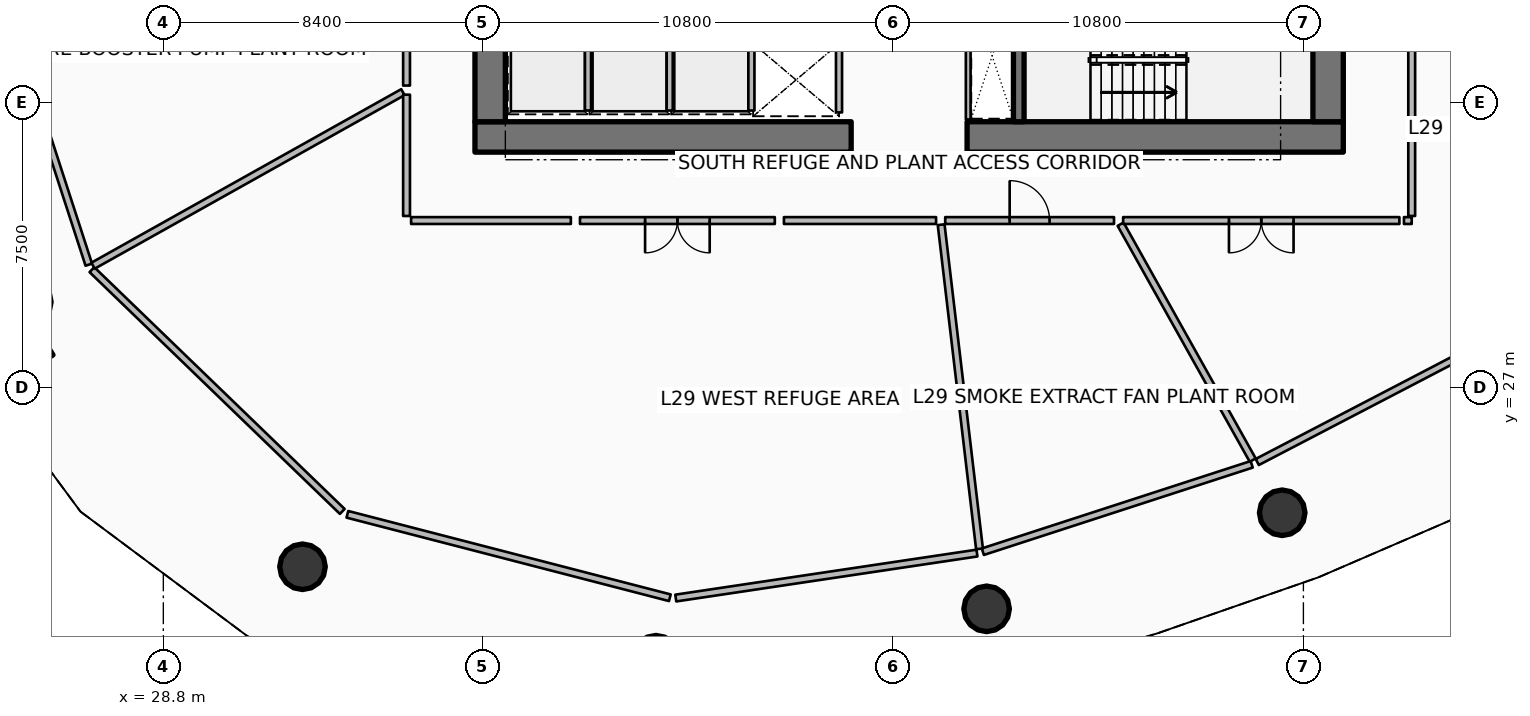
"""IFC4 building model, lengths in metres.
Left out: names, types, materials, properties, quantities, classifications, styles, units other than length and angle.
Written with IfcOpenShell. Run it as: python <this file> out.ifc"""

import sys

from ifc_helpers import new_model, si_unit, direction, frame, frame_2d, origin, origin_2d, place, context, subcontext, project, spatial, rectangle, circle, extrude, element, fill, save


model = new_model("IFC4")
c1 = context("Model", 3, precision=1e-05, world=origin(), true_north=direction((0.0, 1.0)))
c2 = subcontext(c1, "Body", "Model", "MODEL_VIEW")
j1 = project(units=[si_unit("LENGTHUNIT", "METRE"), si_unit("PLANEANGLEUNIT", "RADIAN")], contexts=[c1])
p1 = place(None, origin())
s1 = spatial("IfcSite", under=j1, at=p1, CompositionType="ELEMENT")
p2 = place(p1, origin())
s2 = spatial("IfcBuilding", under=s1, at=p2, CompositionType="ELEMENT")
p3 = place(p2, frame((0.0, 0.0, 116.4)))
s3 = spatial("IfcBuildingStorey", under=s2, at=p3, CompositionType="ELEMENT", Elevation=116.4)
p4 = place(p3, frame((37.0, 33.6, 0.0), z_axis=(0.0, 0.0, 1.0), x_axis=(1.0, 0.0, 0.0)))
e1 = element("IfcWall", 1, at=p4, inside=s3, PredefinedType="SHEAR", context=c2, shape_type="SweptSolid", body=[
    extrude(rectangle(XDim=9.9, YDim=0.8, at=frame_2d((4.95, 0.0))), origin(), (0.0, 0.0, 1.0), 6.6),
])
p5 = place(p3, frame((49.95, 33.6, 0.0), z_axis=(0.0, 0.0, 1.0), x_axis=(1.0, 0.0, 0.0)))
e2 = element("IfcWall", 2, at=p5, inside=s3, PredefinedType="SHEAR", context=c2, shape_type="SweptSolid", body=[
    extrude(rectangle(XDim=9.9, YDim=0.8, at=frame_2d((4.95, 0.0))), origin(), (0.0, 0.0, 1.0), 6.6),
])
for number, where, z_axis, x_axis in (
    (3, (37.4, 34.0, 0.0), (0.0, 0.0, 1.0), (0.0, 1.0, 0.0)),
    (4, (59.45, 34.0, 0.0), (0.0, 0.0, 1.0), (0.0, 1.0, 0.0)),
):
    element("IfcWall", number, at=place(p3, frame(where, z_axis=z_axis, x_axis=x_axis)), inside=s3, PredefinedType="SHEAR", context=c2, shape_type="SweptSolid", body=[
        extrude(rectangle(XDim=16.0, YDim=0.8, at=frame_2d((8.0, 0.0))), origin(), (0.0, 0.0, 1.0), 6.6),
    ])
p6 = place(p3, frame((51.31, 34.0, 0.0), z_axis=(0.0, 0.0, 1.0), x_axis=(0.0, 1.0, 0.0)))
e5 = element("IfcWall", 5, at=p6, inside=s3, PredefinedType="SHEAR", context=c2, shape_type="SweptSolid", body=[
    extrude(rectangle(XDim=3.5, YDim=0.28, at=frame_2d((1.75, 0.0))), origin(), (0.0, 0.0, 1.0), 6.6),
])
p7 = place(p3, frame((25.751, 28.097, 0.0), z_axis=(0.0, 0.0, 1.0), x_axis=(-0.848033572426, -0.529942506352, 0.0)))
e6 = element("IfcWall", 6, at=p7, inside=s3, PredefinedType="SOLIDWALL", context=c2, shape_type="SweptSolid", body=[
    extrude(rectangle(XDim=3.5, YDim=0.55, at=frame_2d((1.75, 0.0))), origin(), (0.0, 0.0, 1.0), 6.6),
])
for number, where, z_axis, x_axis in (
    (7, (32.462, 22.29, 0.0), (0.0, 0.0, 1.0), (1.0, 0.0, 0.0)),
    (8, (41.763, 19.884, 0.0), (0.0, 0.0, 1.0), (1.0, 0.0, 0.0)),
    (9, (50.464, 21.183, 0.0), (0.0, 0.0, 1.0), (1.0, 0.0, 0.0)),
    (10, (58.242, 23.711, 0.0), (0.0, 0.0, 1.0), (1.0, 0.0, 0.0)),
):
    element("IfcColumn", number, at=place(p3, frame(where, z_axis=z_axis, x_axis=x_axis)), inside=s3, PredefinedType="COLUMN", context=c2, shape_type="SweptSolid", body=[
        extrude(circle(Radius=0.6, at=origin_2d()), origin(), (0.0, 0.0, 1.0), 6.28),
    ])
for number, where, z_axis, x_axis in (
    (11, (39.975, 34.295, 0.0), (0.0, 0.0, 1.0), (0.0, 1.0, 0.0)),
    (12, (42.125, 34.295, 0.0), (0.0, 0.0, 1.0), (0.0, 1.0, 0.0)),
    (13, (44.275, 34.295, 0.0), (0.0, 0.0, 1.0), (0.0, 1.0, 0.0)),
):
    element("IfcWall", number, at=place(p3, frame(where, z_axis=z_axis, x_axis=x_axis)), inside=s3, PredefinedType="PARTITIONING", context=c2, shape_type="SweptSolid", body=[
        extrude(rectangle(XDim=1.61, YDim=0.16, at=frame_2d((0.805, 0.0))), origin(), (0.0, 0.0, 1.0), 6.28),
    ])
p8 = place(p3, frame((46.58, 34.245, 0.0), z_axis=(0.0, 0.0, 1.0), x_axis=(0.0, 1.0, 0.0)))
e14 = element("IfcWall", 14, at=p8, inside=s3, PredefinedType="PARTITIONING", context=c2, shape_type="SweptSolid", body=[
    extrude(rectangle(XDim=1.71, YDim=0.16, at=frame_2d((0.855, 0.0))), origin(), (0.0, 0.0, 1.0), 6.28),
])
p9 = place(p3, frame((49.98, 34.06, 0.0), z_axis=(0.0, 0.0, 1.0), x_axis=(0.0, 1.0, 0.0)))
e15 = element("IfcWall", 15, at=p9, inside=s3, PredefinedType="PARTITIONING", context=c2, shape_type="SweptSolid", body=[
    extrude(rectangle(XDim=3.4, YDim=0.125, at=frame_2d((1.7, 0.0))), origin(), (0.0, 0.0, 1.0), 5.72),
])
p10 = place(p3, frame((23.967, 39.076, 0.0), z_axis=(0.0, 0.0, 1.0), x_axis=(0.309006462603, -0.951059938211, 0.0)))
e16 = element("IfcWall", 16, at=p10, inside=s3, PredefinedType="PARTITIONING", context=c2, shape_type="SweptSolid", body=[
    extrude(rectangle(XDim=9.292, YDim=0.18, at=frame_2d((4.646, 0.0))), origin(), (0.0, 0.0, 1.0), 5.273),
])
p11 = place(p3, frame((26.921, 30.107, 0.0), z_axis=(0.0, 0.0, 1.0), x_axis=(0.719342658177, -0.694655411069, 0.0)))
e17 = element("IfcWall", 17, at=p11, inside=s3, PredefinedType="PARTITIONING", context=c2, shape_type="SweptSolid", body=[
    extrude(rectangle(XDim=9.157, YDim=0.18, at=frame_2d((4.579, 0.0))), origin(), (0.0, 0.0, 1.0), 2.304),
])
p12 = place(p3, frame((33.643, 23.67, 0.0), z_axis=(0.0, 0.0, 1.0), x_axis=(0.968122342154, -0.250477804651, 0.0)))
e18 = element("IfcWall", 18, at=p12, inside=s3, PredefinedType="PARTITIONING", context=c2, shape_type="SweptSolid", body=[
    extrude(rectangle(XDim=8.764, YDim=0.18, at=frame_2d((4.382, 0.0))), origin(), (0.0, 0.0, 1.0), 2.304),
])
p13 = place(p3, frame((42.285, 21.467, 0.0), z_axis=(0.0, 0.0, 1.0), x_axis=(0.989034471801, 0.147684845497, 0.0)))
e19 = element("IfcWall", 19, at=p13, inside=s3, PredefinedType="PARTITIONING", context=c2, shape_type="SweptSolid", body=[
    extrude(rectangle(XDim=8.013, YDim=0.18, at=frame_2d((4.006, 0.0))), origin(), (0.0, 0.0, 1.0), 2.304),
])
p14 = place(p3, frame((50.365, 22.687, 0.0), z_axis=(0.0, 0.0, 1.0), x_axis=(0.951058670218, 0.309010365204, 0.0)))
e20 = element("IfcWall", 20, at=p14, inside=s3, PredefinedType="PARTITIONING", context=c2, shape_type="SweptSolid", body=[
    extrude(rectangle(XDim=7.438, YDim=0.18, at=frame_2d((3.719, 0.0))), origin(), (0.0, 0.0, 1.0), 5.273),
])
p15 = place(p3, frame((57.586, 25.047, 0.0), z_axis=(0.0, 0.0, 1.0), x_axis=(0.886950751462, 0.46186401081, 0.0)))
e21 = element("IfcWall", 21, at=p15, inside=s3, PredefinedType="PARTITIONING", context=c2, shape_type="SweptSolid", body=[
    extrude(rectangle(XDim=8.012, YDim=0.18, at=frame_2d((4.006, 0.0))), origin(), (0.0, 0.0, 1.0), 2.304),
])
p16 = place(p3, frame((35.2, 40.365, 0.0), z_axis=(0.0, 0.0, 1.0), x_axis=(0.0, -1.0, 0.0)))
e22 = element("IfcWall", 22, at=p16, inside=s3, PredefinedType="PARTITIONING", context=c2, shape_type="SweptSolid", body=[
    extrude(rectangle(XDim=5.413, YDim=0.18, at=frame_2d((2.707, 0.0))), origin(), (0.0, 0.0, 1.0), 5.273),
])
p17 = place(p16, frame((2.182, 0.0, 0.0)))
e23 = element("IfcOpeningElement", 23, at=p17, cuts=e22, PredefinedType="OPENING", context=c2, shape_type="SweptSolid", body=[
    extrude(rectangle(XDim=1.05, YDim=2.1, at=frame_2d((0.525, 1.05))), frame((0.0, 0.1, 0.0), z_axis=(0.0, -1.0, 0.0), x_axis=(1.0, 0.0, 0.0)), (0.0, 0.0, 1.0), 0.2),
])
p18 = place(p3, frame((35.104, 34.778, 0.0), z_axis=(0.0, 0.0, 1.0), x_axis=(-0.872492204965, -0.488628030586, 0.0)))
e24 = element("IfcWall", 24, at=p18, inside=s3, PredefinedType="PARTITIONING", context=c2, shape_type="SweptSolid", body=[
    extrude(rectangle(XDim=9.345, YDim=0.18, at=frame_2d((4.672, 0.0))), origin(), (0.0, 0.0, 1.0), 5.273),
])
p19 = place(p3, frame((35.2, 34.712, 0.0), z_axis=(0.0, 0.0, 1.0), x_axis=(0.0, -1.0, 0.0)))
e25 = element("IfcWall", 25, at=p19, inside=s3, PredefinedType="PARTITIONING", context=c2, shape_type="SweptSolid", body=[
    extrude(rectangle(XDim=3.192, YDim=0.18, at=frame_2d((1.596, 0.0))), origin(), (0.0, 0.0, 1.0), 5.273),
])
p20 = place(p3, frame((35.32, 31.4, 0.0), z_axis=(0.0, 0.0, 1.0), x_axis=(1.0, 0.0, 0.0)))
e26 = element("IfcWall", 26, at=p20, inside=s3, PredefinedType="PARTITIONING", context=c2, shape_type="SweptSolid", body=[
    extrude(rectangle(XDim=4.204, YDim=0.18, at=frame_2d((2.102, 0.0))), origin(), (0.0, 0.0, 1.0), 2.304),
])
p21 = place(p3, frame((39.764, 31.4, 0.0), z_axis=(0.0, 0.0, 1.0), x_axis=(1.0, 0.0, 0.0)))
e27 = element("IfcWall", 27, at=p21, inside=s3, PredefinedType="PARTITIONING", context=c2, shape_type="SweptSolid", body=[
    extrude(rectangle(XDim=5.127, YDim=0.18, at=frame_2d((2.563, 0.0))), origin(), (0.0, 0.0, 1.0), 2.304),
])
p22 = place(p21, frame((1.713, 0.0, 0.0)))
e28 = element("IfcOpeningElement", 28, at=p22, cuts=e27, PredefinedType="OPENING", context=c2, shape_type="SweptSolid", body=[
    extrude(rectangle(XDim=1.7, YDim=2.15, at=frame_2d((0.85, 1.075))), frame((0.0, 0.1, 0.0), z_axis=(0.0, -1.0, 0.0), x_axis=(1.0, 0.0, 0.0)), (0.0, 0.0, 1.0), 0.2),
])
p23 = place(p3, frame((45.131, 31.4, 0.0), z_axis=(0.0, 0.0, 1.0), x_axis=(1.0, 0.0, 0.0)))
e29 = element("IfcWall", 29, at=p23, inside=s3, PredefinedType="PARTITIONING", context=c2, shape_type="SweptSolid", body=[
    extrude(rectangle(XDim=4.004, YDim=0.18, at=frame_2d((2.002, 0.0))), origin(), (0.0, 0.0, 1.0), 2.304),
])
p24 = place(p3, frame((49.268, 31.291, 0.0), z_axis=(0.0, 0.0, 1.0), x_axis=(0.117538852682, -0.993068284717, 0.0)))
e30 = element("IfcWall", 30, at=p24, inside=s3, PredefinedType="PARTITIONING", context=c2, shape_type="SweptSolid", body=[
    extrude(rectangle(XDim=8.589, YDim=0.18, at=frame_2d((4.294, 0.0))), origin(), (0.0, 0.0, 1.0), 5.273),
])
p25 = place(p3, frame((49.375, 31.4, 0.0), z_axis=(0.0, 0.0, 1.0), x_axis=(1.0, 0.0, 0.0)))
e31 = element("IfcWall", 31, at=p25, inside=s3, PredefinedType="PARTITIONING", context=c2, shape_type="SweptSolid", body=[
    extrude(rectangle(XDim=4.442, YDim=0.18, at=frame_2d((2.221, 0.0))), origin(), (0.0, 0.0, 1.0), 5.273),
])
p26 = place(p25, frame((1.696, 0.0, 0.0)))
e32 = element("IfcOpeningElement", 32, at=p26, cuts=e31, PredefinedType="OPENING", context=c2, shape_type="SweptSolid", body=[
    extrude(rectangle(XDim=1.05, YDim=2.1, at=frame_2d((0.525, 1.05))), frame((0.0, 0.1, 0.0), z_axis=(0.0, -1.0, 0.0), x_axis=(1.0, 0.0, 0.0)), (0.0, 0.0, 1.0), 0.2),
])
p27 = place(p3, frame((53.99, 31.304, 0.0), z_axis=(0.0, 0.0, 1.0), x_axis=(0.488621135235, -0.872496066583, 0.0)))
e33 = element("IfcWall", 33, at=p27, inside=s3, PredefinedType="PARTITIONING", context=c2, shape_type="SweptSolid", body=[
    extrude(rectangle(XDim=7.114, YDim=0.18, at=frame_2d((3.557, 0.0))), origin(), (0.0, 0.0, 1.0), 5.273),
])
p28 = place(p3, frame((54.056, 31.4, 0.0), z_axis=(0.0, 0.0, 1.0), x_axis=(1.0, 0.0, 0.0)))
e34 = element("IfcWall", 34, at=p28, inside=s3, PredefinedType="PARTITIONING", context=c2, shape_type="SweptSolid", body=[
    extrude(rectangle(XDim=7.27, YDim=0.18, at=frame_2d((3.635, 0.0))), origin(), (0.0, 0.0, 1.0), 2.304),
])
p29 = place(p28, frame((2.785, 0.0, 0.0)))
e35 = element("IfcOpeningElement", 35, at=p29, cuts=e34, PredefinedType="OPENING", context=c2, shape_type="SweptSolid", body=[
    extrude(rectangle(XDim=1.7, YDim=2.15, at=frame_2d((0.85, 1.075))), frame((0.0, 0.1, 0.0), z_axis=(0.0, -1.0, 0.0), x_axis=(1.0, 0.0, 0.0)), (0.0, 0.0, 1.0), 0.2),
])
p30 = place(p3, frame((61.446, 31.4, 0.0), z_axis=(0.0, 0.0, 1.0), x_axis=(1.0, 0.0, 0.0)))
e36 = element("IfcWall", 36, at=p30, inside=s3, PredefinedType="PARTITIONING", context=c2, shape_type="SweptSolid", body=[
    extrude(rectangle(XDim=0.204, YDim=0.18, at=frame_2d((0.102, 0.0))), origin(), (0.0, 0.0, 1.0), 2.304),
])
p31 = place(p3, frame((61.65, 31.52, 0.0), z_axis=(0.0, 0.0, 1.0), x_axis=(0.0, 1.0, 0.0)))
e37 = element("IfcWall", 37, at=p31, inside=s3, PredefinedType="PARTITIONING", context=c2, shape_type="SweptSolid", body=[
    extrude(rectangle(XDim=6.51, YDim=0.18, at=frame_2d((3.255, 0.0))), origin(), (0.0, 0.0, 1.0), 2.304),
])
p32 = place(p3, frame((61.756, 38.12, 0.0), z_axis=(0.0, 0.0, 1.0), x_axis=(0.962455908165, -0.271438068147, 0.0)))
e38 = element("IfcWall", 38, at=p32, inside=s3, PredefinedType="PARTITIONING", context=c2, shape_type="SweptSolid", body=[
    extrude(rectangle(XDim=8.922, YDim=0.18, at=frame_2d((4.461, 0.0))), origin(), (0.0, 0.0, 1.0), 2.304),
])
p33 = place(p22, origin())
e39 = element("IfcDoor", 39, at=p33, inside=s3, OperationType="DOUBLE_DOOR_SINGLE_SWING", PredefinedType="DOOR", context=c2, shape_type="SweptSolid", body=[
    extrude(rectangle(XDim=1.7, YDim=2.15, at=frame_2d((0.85, 1.075))), frame((0.0, 0.025, 0.0), z_axis=(0.0, -1.0, 0.0), x_axis=(1.0, 0.0, 0.0)), (0.0, 0.0, 1.0), 0.05),
])
fill(e28, e39)
p34 = place(p26, origin())
e40 = element("IfcDoor", 40, at=p34, inside=s3, OperationType="SINGLE_SWING_LEFT", PredefinedType="DOOR", context=c2, shape_type="SweptSolid", body=[
    extrude(rectangle(XDim=1.05, YDim=2.1, at=frame_2d((0.525, 1.05))), frame((0.0, 0.025, 0.0), z_axis=(0.0, -1.0, 0.0), x_axis=(1.0, 0.0, 0.0)), (0.0, 0.0, 1.0), 0.05),
])
fill(e32, e40)
p35 = place(p29, origin())
e41 = element("IfcDoor", 41, at=p35, inside=s3, OperationType="DOUBLE_DOOR_SINGLE_SWING", PredefinedType="DOOR", context=c2, shape_type="SweptSolid", body=[
    extrude(rectangle(XDim=1.7, YDim=2.15, at=frame_2d((0.85, 1.075))), frame((0.0, 0.025, 0.0), z_axis=(0.0, -1.0, 0.0), x_axis=(1.0, 0.0, 0.0)), (0.0, 0.0, 1.0), 0.05),
])
fill(e35, e41)
save(model, sys.argv[1])
